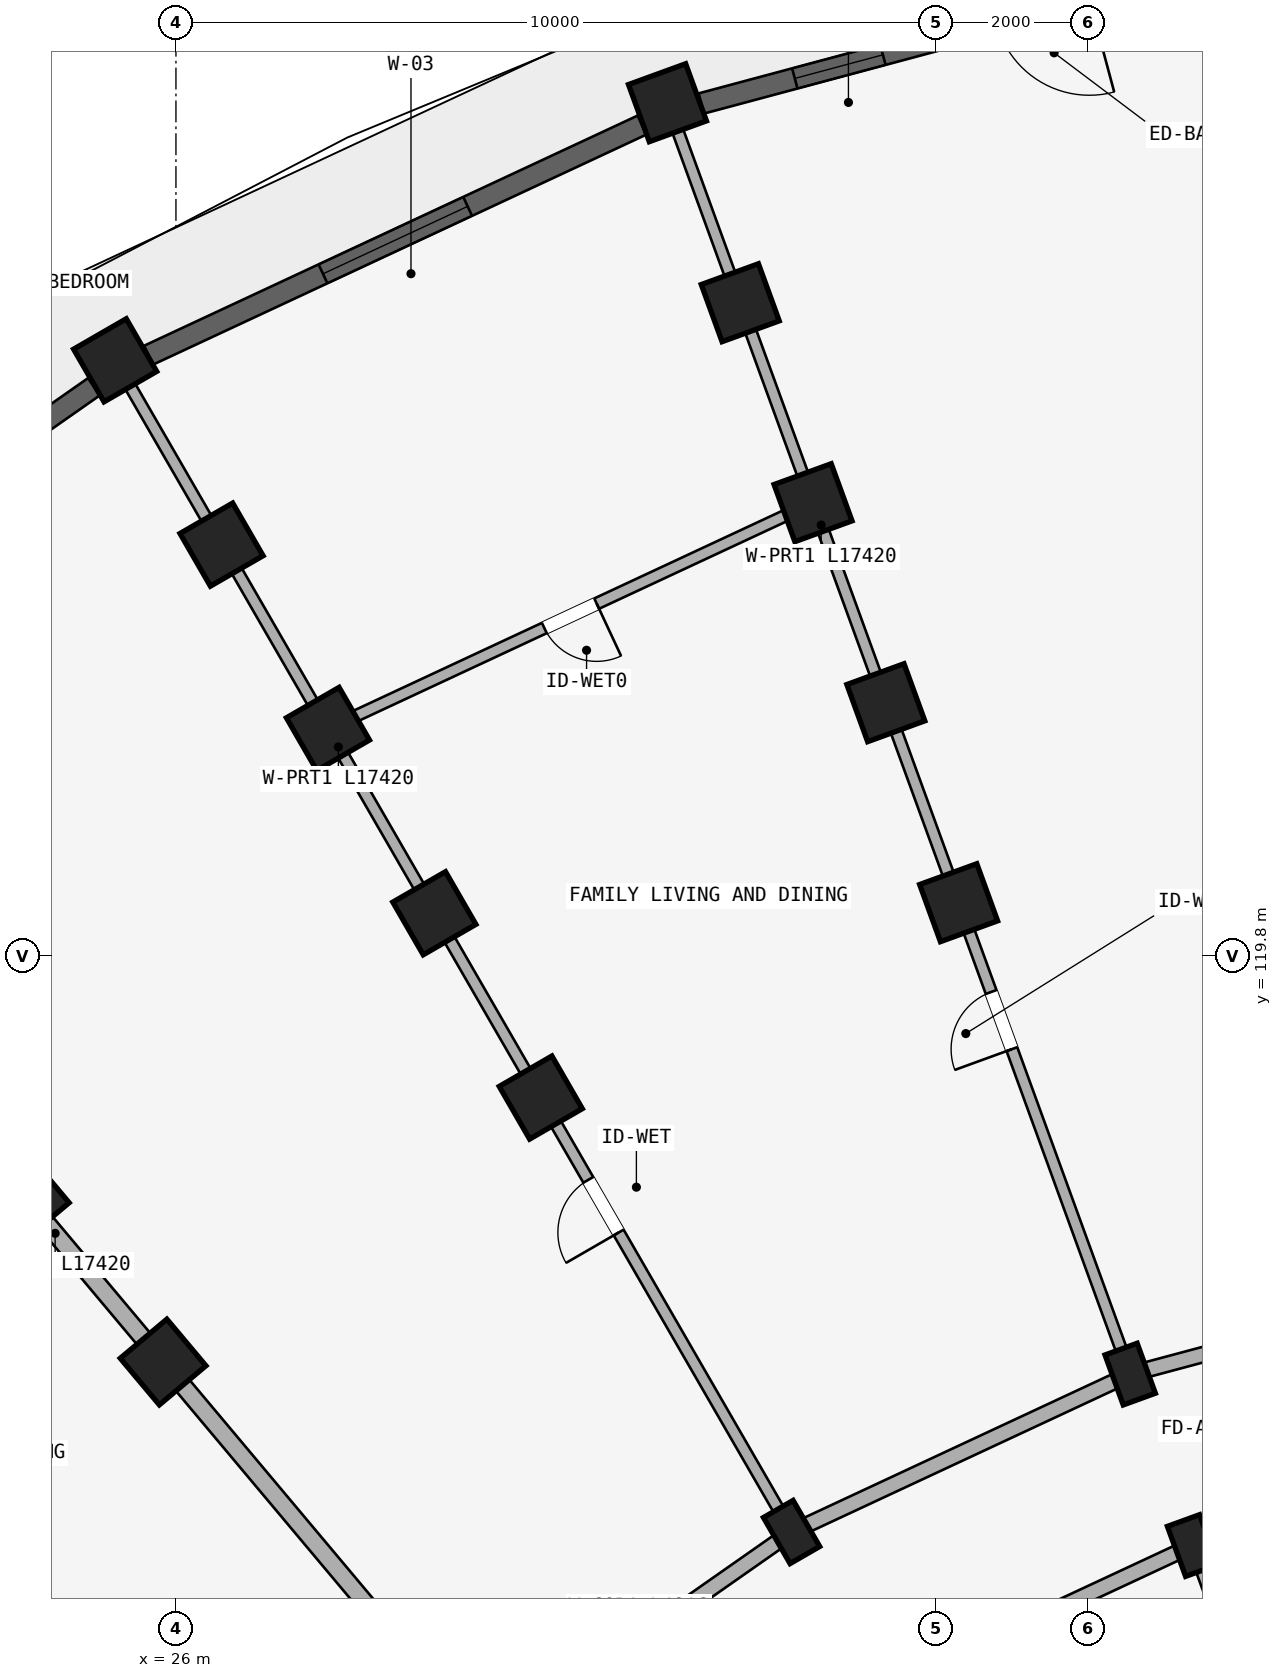
"""IFC4 building model, lengths in metres.
Left out: names, types, materials, properties, quantities, classifications, styles, units other than length and angle.
Written with IfcOpenShell. Run it as: python <this file> out.ifc"""

import sys

from ifc_helpers import new_model, si_unit, direction, frame, frame_2d, origin, origin_2d, place, context, subcontext, project, spatial, rectangle, extrude, element, fill, save


model = new_model("IFC4")
c1 = context("Model", 3, precision=1e-05, world=origin(), true_north=direction((0.0, 1.0)))
c2 = subcontext(c1, "Body", "Model", "MODEL_VIEW")
j1 = project(units=[si_unit("LENGTHUNIT", "METRE"), si_unit("PLANEANGLEUNIT", "RADIAN")], contexts=[c1])
p1 = place(None, origin())
s1 = spatial("IfcSite", under=j1, at=p1, CompositionType="ELEMENT")
p2 = place(p1, origin())
s2 = spatial("IfcBuilding", under=s1, at=p2, CompositionType="ELEMENT")
p3 = place(p2, frame((0.0, 0.0, 11.85)))
s3 = spatial("IfcBuildingStorey", under=s2, at=p3, CompositionType="ELEMENT", Elevation=11.85)
for number, where, z_axis, x_axis in (
    (1, (39.376, 112.044, 0.0), (0.0, 0.0, 1.0), (0.94, 0.342, 0.0)),
    (2, (38.555, 114.299, 0.0), (0.0, 0.0, 1.0), (0.94, 0.342, 0.0)),
):
    element("IfcColumn", number, at=place(p3, frame(where, z_axis=z_axis, x_axis=x_axis)), inside=s3, PredefinedType="COLUMN", context=c2, shape_type="SweptSolid", body=[
        extrude(rectangle(XDim=0.45, YDim=0.7, at=origin_2d()), origin(), (0.0, 0.0, 1.0), 2.93),
    ])
for number, where, z_axis, x_axis in (
    (3, (36.298, 120.501, 0.0), (0.0, 0.0, 1.0), (0.94, 0.342, 0.0)),
    (4, (35.34, 123.132, 0.0), (0.0, 0.0, 1.0), (0.94, 0.342, 0.0)),
    (5, (34.382, 125.764, 0.0), (0.0, 0.0, 1.0), (0.94, 0.342, 0.0)),
    (6, (33.425, 128.395, 0.0), (0.0, 0.0, 1.0), (0.94, 0.342, 0.0)),
    (7, (32.467, 131.026, 0.0), (0.0, 0.0, 1.0), (0.94, 0.342, 0.0)),
):
    element("IfcColumn", number, at=place(p3, frame(where, z_axis=z_axis, x_axis=x_axis)), inside=s3, PredefinedType="COLUMN", context=c2, shape_type="SweptSolid", body=[
        extrude(rectangle(XDim=0.8, YDim=0.8, at=origin_2d()), origin(), (0.0, 0.0, 1.0), 2.93),
    ])
p4 = place(p3, frame((34.1, 112.222, 0.0), z_axis=(0.0, 0.0, 1.0), x_axis=(0.866025403784, 0.5, 0.0)))
e8 = element("IfcColumn", 8, at=p4, inside=s3, PredefinedType="COLUMN", context=c2, shape_type="SweptSolid", body=[
    extrude(rectangle(XDim=0.45, YDim=0.7, at=origin_2d()), origin(), (0.0, 0.0, 1.0), 2.93),
])
for number, where, z_axis, x_axis in (
    (9, (30.8, 117.938, 0.0), (0.0, 0.0, 1.0), (0.866, 0.5, 0.0)),
    (10, (29.4, 120.363, 0.0), (0.0, 0.0, 1.0), (0.866, 0.5, 0.0)),
    (11, (28.0, 122.787, 0.0), (0.0, 0.0, 1.0), (0.866, 0.5, 0.0)),
    (12, (26.6, 125.212, 0.0), (0.0, 0.0, 1.0), (0.866, 0.5, 0.0)),
    (13, (25.2, 127.637, 0.0), (0.0, 0.0, 1.0), (0.866, 0.5, 0.0)),
    (14, (25.831, 114.458, 0.0), (0.0, 0.0, 1.0), (0.766, 0.643, 0.0)),
    (15, (24.031, 116.603, 0.0), (0.0, 0.0, 1.0), (0.766, 0.643, 0.0)),
):
    element("IfcColumn", number, at=place(p3, frame(where, z_axis=z_axis, x_axis=x_axis)), inside=s3, PredefinedType="COLUMN", context=c2, shape_type="SweptSolid", body=[
        extrude(rectangle(XDim=0.8, YDim=0.8, at=origin_2d()), origin(), (0.0, 0.0, 1.0), 2.93),
    ])
p5 = place(p3, frame((43.72, 113.208, 0.0), z_axis=(0.0, 0.0, 1.0), x_axis=(-0.965934240054, -0.258787642463, 0.0)))
e16 = element("IfcWall", 16, at=p5, inside=s3, PredefinedType="STANDARD", context=c2, shape_type="SweptSolid", body=[
    extrude(rectangle(XDim=4.497, YDim=0.2, at=frame_2d((2.249, 0.0))), origin(), (0.0, 0.0, 1.0), 2.372),
])
p6 = place(p3, frame((43.303, 115.572, 0.0), z_axis=(0.0, 0.0, 1.0), x_axis=(-0.965930095386, -0.258803112091, 0.0)))
e17 = element("IfcWall", 17, at=p6, inside=s3, PredefinedType="STANDARD", context=c2, shape_type="SweptSolid", body=[
    extrude(rectangle(XDim=4.916, YDim=0.2, at=frame_2d((2.458, 0.0))), origin(), (0.0, 0.0, 1.0), 2.372),
])
p7 = place(p6, frame((1.918, 0.0, 0.0)))
e18 = element("IfcOpeningElement", 18, at=p7, cuts=e17, PredefinedType="OPENING", context=c2, shape_type="SweptSolid", body=[
    extrude(rectangle(XDim=1.08, YDim=2.15, at=frame_2d((0.54, 1.075))), frame((0.0, 0.11, 0.0), z_axis=(0.0, -1.0, 0.0), x_axis=(1.0, 0.0, 0.0)), (0.0, 0.0, 1.0), 0.22),
])
p8 = place(p3, frame((39.376, 112.044, 0.0), z_axis=(0.0, 0.0, 1.0), x_axis=(-0.906307919131, -0.422617978463, 0.0)))
e19 = element("IfcWall", 19, at=p8, inside=s3, PredefinedType="STANDARD", context=c2, shape_type="SweptSolid", body=[
    extrude(rectangle(XDim=4.497, YDim=0.2, at=frame_2d((2.249, 0.0))), origin(), (0.0, 0.0, 1.0), 2.372),
])
p9 = place(p3, frame((38.555, 114.299, 0.0), z_axis=(0.0, 0.0, 1.0), x_axis=(-0.906302381024, -0.422629854778, 0.0)))
e20 = element("IfcWall", 20, at=p9, inside=s3, PredefinedType="STANDARD", context=c2, shape_type="SweptSolid", body=[
    extrude(rectangle(XDim=4.915, YDim=0.2, at=frame_2d((2.458, 0.0))), origin(), (0.0, 0.0, 1.0), 2.372),
])
p10 = place(p3, frame((34.1, 112.222, 0.0), z_axis=(0.0, 0.0, 1.0), x_axis=(-0.819140911474, -0.573592335331, 0.0)))
e21 = element("IfcWall", 21, at=p10, inside=s3, PredefinedType="STANDARD", context=c2, shape_type="SweptSolid", body=[
    extrude(rectangle(XDim=4.916, YDim=0.2, at=frame_2d((2.458, 0.0))), origin(), (0.0, 0.0, 1.0), 2.372),
])
p11 = place(p3, frame((41.702, 105.654, 0.0), z_axis=(0.0, 0.0, 1.0), x_axis=(-0.342010221662, 0.939696231917, 0.0)))
e22 = element("IfcWall", 22, at=p11, inside=s3, PredefinedType="PARTITIONING", context=c2, shape_type="SweptSolid", body=[
    extrude(rectangle(XDim=6.75, YDim=0.15, at=frame_2d((3.375, 0.0))), origin(), (0.0, 0.0, 1.0), 2.372),
])
p12 = place(p11, frame((3.262, 0.0, 0.0)))
e23 = element("IfcOpeningElement", 23, at=p12, cuts=e22, PredefinedType="OPENING", context=c2, shape_type="SweptSolid", body=[
    extrude(rectangle(XDim=0.9, YDim=2.1, at=frame_2d((0.45, 1.05))), frame((0.0, 0.085, 0.0), z_axis=(0.0, -1.0, 0.0), x_axis=(1.0, 0.0, 0.0)), (0.0, 0.0, 1.0), 0.17),
])
p13 = place(p3, frame((38.521, 114.393, 0.0), z_axis=(0.0, 0.0, 1.0), x_axis=(-0.342022120477, 0.939691901159, 0.0)))
e24 = element("IfcWall", 24, at=p13, inside=s3, PredefinedType="PARTITIONING", context=c2, shape_type="SweptSolid", body=[
    extrude(rectangle(XDim=17.42, YDim=0.15, at=frame_2d((8.71, 0.0))), origin(), (0.0, 0.0, 1.0), 2.372),
])
p14 = place(p13, frame((4.45, 0.0, 0.0)))
e25 = element("IfcOpeningElement", 25, at=p14, cuts=e24, PredefinedType="OPENING", context=c2, shape_type="SweptSolid", body=[
    extrude(rectangle(XDim=0.8, YDim=2.1, at=frame_2d((0.4, 1.05))), frame((0.0, 0.085, 0.0), z_axis=(0.0, -1.0, 0.0), x_axis=(1.0, 0.0, 0.0)), (0.0, 0.0, 1.0), 0.17),
])
p15 = place(p3, frame((34.05, 112.309, 0.0), z_axis=(0.0, 0.0, 1.0), x_axis=(-0.499997843263, 0.866026648973, 0.0)))
e26 = element("IfcWall", 26, at=p15, inside=s3, PredefinedType="PARTITIONING", context=c2, shape_type="SweptSolid", body=[
    extrude(rectangle(XDim=17.42, YDim=0.15, at=frame_2d((8.71, 0.0))), origin(), (0.0, 0.0, 1.0), 2.372),
])
p16 = place(p15, frame((4.45, 0.0, 0.0)))
e27 = element("IfcOpeningElement", 27, at=p16, cuts=e26, PredefinedType="OPENING", context=c2, shape_type="SweptSolid", body=[
    extrude(rectangle(XDim=0.8, YDim=2.1, at=frame_2d((0.4, 1.05))), frame((0.0, 0.085, 0.0), z_axis=(0.0, -1.0, 0.0), x_axis=(1.0, 0.0, 0.0)), (0.0, 0.0, 1.0), 0.17),
])
p17 = place(p3, frame((30.009, 109.479, 0.0), z_axis=(0.0, 0.0, 1.0), x_axis=(-0.642784757967, 0.766046835987, 0.0)))
e28 = element("IfcWall", 28, at=p17, inside=s3, PredefinedType="STANDARD", context=c2, shape_type="SweptSolid", body=[
    extrude(rectangle(XDim=17.42, YDim=0.23, at=frame_2d((8.71, 0.0))), origin(), (0.0, 0.0, 1.0), 2.372),
])
p18 = place(p3, frame((26.521, 105.991, 0.0), z_axis=(0.0, 0.0, 1.0), x_axis=(-0.766046835987, 0.642784757967, 0.0)))
e29 = element("IfcWall", 29, at=p18, inside=s3, PredefinedType="PARTITIONING", context=c2, shape_type="SweptSolid", body=[
    extrude(rectangle(XDim=17.42, YDim=0.15, at=frame_2d((8.71, 0.0))), origin(), (0.0, 0.0, 1.0), 2.372),
])
p19 = place(p18, frame((4.45, 0.0, 0.0)))
e30 = element("IfcOpeningElement", 30, at=p19, cuts=e29, PredefinedType="OPENING", context=c2, shape_type="SweptSolid", body=[
    extrude(rectangle(XDim=0.8, YDim=2.1, at=frame_2d((0.4, 1.05))), frame((0.0, 0.085, 0.0), z_axis=(0.0, -1.0, 0.0), x_axis=(1.0, 0.0, 0.0)), (0.0, 0.0, 1.0), 0.17),
])
p20 = place(p3, frame((34.382, 125.764, 0.0), z_axis=(0.0, 0.0, 1.0), x_axis=(-0.906297360311, -0.422640621205, 0.0)))
e31 = element("IfcWall", 31, at=p20, inside=s3, PredefinedType="PLUMBINGWALL", context=c2, shape_type="SweptSolid", body=[
    extrude(rectangle(XDim=7.042, YDim=0.15, at=frame_2d((3.521, 0.0))), origin(), (0.0, 0.0, 1.0), 2.372),
])
p21 = place(p20, frame((3.141, 0.0, 0.0)))
e32 = element("IfcOpeningElement", 32, at=p21, cuts=e31, PredefinedType="OPENING", context=c2, shape_type="SweptSolid", body=[
    extrude(rectangle(XDim=0.76, YDim=2.05, at=frame_2d((0.38, 1.025))), frame((0.0, 0.085, 0.0), z_axis=(0.0, -1.0, 0.0), x_axis=(1.0, 0.0, 0.0)), (0.0, 0.0, 1.0), 0.17),
])
p22 = place(p3, frame((39.832, 132.87, 0.0), z_axis=(0.0, 0.0, 1.0), x_axis=(-0.965923712619, -0.258826933296, 0.0)))
e33 = element("IfcWall", 33, at=p22, inside=s3, PredefinedType="STANDARD", context=c2, shape_type="SweptSolid", body=[
    extrude(rectangle(XDim=7.164, YDim=0.275, at=frame_2d((3.582, 0.0))), origin(), (0.0, 0.0, 1.0), 2.372),
])
p23 = place(p22, frame((4.69, 0.0, 0.522)))
e34 = element("IfcOpeningElement", 34, at=p23, cuts=e33, PredefinedType="OPENING", context=c2, shape_type="SweptSolid", body=[
    extrude(rectangle(XDim=1.2, YDim=1.5, at=frame_2d((0.6, 0.75))), frame((0.0, 0.147, 0.0), z_axis=(0.0, -1.0, 0.0), x_axis=(1.0, 0.0, 0.0)), (0.0, 0.0, 1.0), 0.295),
])
p24 = place(p22, frame((1.877, 0.0, 0.0)))
e35 = element("IfcOpeningElement", 35, at=p24, cuts=e33, PredefinedType="OPENING", context=c2, shape_type="SweptSolid", body=[
    extrude(rectangle(XDim=1.26, YDim=2.15, at=frame_2d((0.63, 1.075))), frame((0.0, 0.147, 0.0), z_axis=(0.0, -1.0, 0.0), x_axis=(1.0, 0.0, 0.0)), (0.0, 0.0, 1.0), 0.295),
])
p25 = place(p3, frame((32.133, 130.732, 0.0), z_axis=(0.0, 0.0, 1.0), x_axis=(-0.906300636296, -0.422633596215, 0.0)))
e36 = element("IfcWall", 36, at=p25, inside=s3, PredefinedType="STANDARD", context=c2, shape_type="SweptSolid", body=[
    extrude(rectangle(XDim=7.164, YDim=0.275, at=frame_2d((3.582, 0.0))), origin(), (0.0, 0.0, 1.0), 2.372),
])
p26 = place(p25, frame((2.532, 0.0, 0.372)))
e37 = element("IfcOpeningElement", 37, at=p26, cuts=e36, PredefinedType="OPENING", context=c2, shape_type="SweptSolid", body=[
    extrude(rectangle(XDim=2.1, YDim=1.8, at=frame_2d((1.05, 0.9))), frame((0.0, 0.147, 0.0), z_axis=(0.0, -1.0, 0.0), x_axis=(1.0, 0.0, 0.0)), (0.0, 0.0, 1.0), 0.295),
])
p27 = place(p3, frame((24.922, 127.29, 0.0), z_axis=(0.0, 0.0, 1.0), x_axis=(-0.819161471697, -0.573562972382, 0.0)))
e38 = element("IfcWall", 38, at=p27, inside=s3, PredefinedType="STANDARD", context=c2, shape_type="SweptSolid", body=[
    extrude(rectangle(XDim=7.164, YDim=0.275, at=frame_2d((3.582, 0.0))), origin(), (0.0, 0.0, 1.0), 2.372),
])
p28 = place(p27, frame((2.607, 0.0, 0.322)))
e39 = element("IfcOpeningElement", 39, at=p28, cuts=e38, PredefinedType="OPENING", context=c2, shape_type="SweptSolid", body=[
    extrude(rectangle(XDim=1.95, YDim=1.85, at=frame_2d((0.975, 0.925))), frame((0.0, 0.147, 0.0), z_axis=(0.0, -1.0, 0.0), x_axis=(1.0, 0.0, 0.0)), (0.0, 0.0, 1.0), 0.295),
])
p29 = place(p23, origin())
e40 = element("IfcWindow", 40, at=p29, inside=s3, PartitioningType="SINGLE_PANEL", PredefinedType="WINDOW", context=c2, shape_type="SweptSolid", body=[
    extrude(rectangle(XDim=1.2, YDim=1.5, at=frame_2d((0.6, 0.75))), frame((0.0, 0.03, 0.0), z_axis=(0.0, -1.0, 0.0), x_axis=(1.0, 0.0, 0.0)), (0.0, 0.0, 1.0), 0.06),
])
fill(e34, e40)
p30 = place(p26, origin())
e41 = element("IfcWindow", 41, at=p30, inside=s3, PartitioningType="TRIPLE_PANEL_VERTICAL", PredefinedType="WINDOW", context=c2, shape_type="SweptSolid", body=[
    extrude(rectangle(XDim=2.1, YDim=1.8, at=frame_2d((1.05, 0.9))), frame((0.0, 0.03, 0.0), z_axis=(0.0, -1.0, 0.0), x_axis=(1.0, 0.0, 0.0)), (0.0, 0.0, 1.0), 0.06),
])
fill(e37, e41)
p31 = place(p14, frame((0.8, 0.0, 0.0), z_axis=(0.0, 0.0, 1.0), x_axis=(-1.0, 0.0, 0.0)))
e42 = element("IfcDoor", 42, at=p31, inside=s3, OperationType="SINGLE_SWING_RIGHT", PredefinedType="DOOR", context=c2, shape_type="SweptSolid", body=[
    extrude(rectangle(XDim=0.8, YDim=2.1, at=frame_2d((0.4, 1.05))), frame((0.0, 0.025, 0.0), z_axis=(0.0, -1.0, 0.0), x_axis=(1.0, 0.0, 0.0)), (0.0, 0.0, 1.0), 0.05),
])
fill(e25, e42)
p32 = place(p16, origin())
e43 = element("IfcDoor", 43, at=p32, inside=s3, OperationType="SINGLE_SWING_LEFT", PredefinedType="DOOR", context=c2, shape_type="SweptSolid", body=[
    extrude(rectangle(XDim=0.8, YDim=2.1, at=frame_2d((0.4, 1.05))), frame((0.0, 0.025, 0.0), z_axis=(0.0, -1.0, 0.0), x_axis=(1.0, 0.0, 0.0)), (0.0, 0.0, 1.0), 0.05),
])
fill(e27, e43)
p33 = place(p21, frame((0.76, 0.0, 0.0), z_axis=(0.0, 0.0, 1.0), x_axis=(-1.0, 0.0, 0.0)))
e44 = element("IfcDoor", 44, at=p33, inside=s3, OperationType="SINGLE_SWING_RIGHT", PredefinedType="DOOR", context=c2, shape_type="SweptSolid", body=[
    extrude(rectangle(XDim=0.76, YDim=2.05, at=frame_2d((0.38, 1.025))), frame((0.0, 0.025, 0.0), z_axis=(0.0, -1.0, 0.0), x_axis=(1.0, 0.0, 0.0)), (0.0, 0.0, 1.0), 0.05),
])
fill(e32, e44)
save(model, sys.argv[1])
